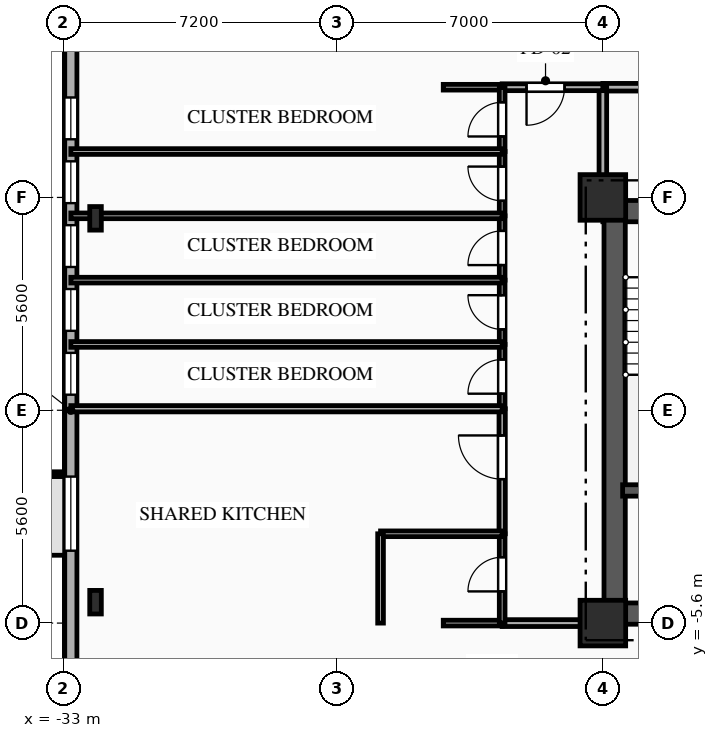
"""IFC4 building model, lengths in metres.
Left out: names, types, materials, properties, quantities, classifications, styles, units other than length and angle.
Written with IfcOpenShell. Run it as: python <this file> out.ifc"""

import sys

from ifc_helpers import new_model, si_unit, direction, frame, frame_2d, origin, origin_2d, place, context, subcontext, project, spatial, rectangle, i_section, extrude, element, fill, save


model = new_model("IFC4")
c1 = context("Model", 3, precision=1e-05, world=origin(), true_north=direction((0.0, 1.0)))
c2 = subcontext(c1, "Body", "Model", "MODEL_VIEW")
j1 = project(units=[si_unit("LENGTHUNIT", "METRE"), si_unit("PLANEANGLEUNIT", "RADIAN")], contexts=[c1])
p1 = place(None, origin())
s1 = spatial("IfcSite", under=j1, at=p1, CompositionType="ELEMENT")
p2 = place(p1, origin())
s2 = spatial("IfcBuilding", under=s1, at=p2, CompositionType="ELEMENT")
p3 = place(p2, frame((0.0, 0.0, 33.7)))
s3 = spatial("IfcBuildingStorey", under=s2, at=p3, CompositionType="ELEMENT", Elevation=33.7)
for number, where, z_axis, x_axis in (
    (1, (-18.8, -5.6, 0.0), (0.0, 0.0, 1.0), (1.0, 0.0, 0.0)),
    (2, (-18.8, 5.6, 0.0), (0.0, 0.0, 1.0), (1.0, 0.0, 0.0)),
):
    element("IfcColumn", number, at=place(p3, frame(where, z_axis=z_axis, x_axis=x_axis)), inside=s3, PredefinedType="COLUMN", context=c2, shape_type="SweptSolid", body=[
        extrude(rectangle(XDim=1.2, YDim=1.2, at=origin_2d()), origin(), (0.0, 0.0, 1.0), 3.35),
    ])
for number, where, z_axis, x_axis in (
    (3, (-32.15, 5.05, 0.0), (0.0, 0.0, 1.0), (1.0, 0.0, 0.0)),
    (4, (-32.15, -5.05, 0.0), (0.0, 0.0, 1.0), (1.0, 0.0, 0.0)),
):
    element("IfcColumn", number, at=place(p3, frame(where, z_axis=z_axis, x_axis=x_axis)), inside=s3, PredefinedType="COLUMN", context=c2, shape_type="SweptSolid", body=[
        extrude(i_section(OverallWidth=0.305, OverallDepth=0.62, WebThickness=0.021, FlangeThickness=0.04, FilletRadius=0.027, at=origin_2d()), origin(), (0.0, 0.0, 1.0), 3.35),
    ])
p4 = place(p3, frame((-32.8, -15.8, 0.0), z_axis=(0.0, 0.0, 1.0), x_axis=(0.0, 1.0, 0.0)))
e5 = element("IfcWall", 5, at=p4, inside=s3, PredefinedType="SOLIDWALL", context=c2, shape_type="SweptSolid", body=[
    extrude(rectangle(XDim=31.6, YDim=0.32, at=frame_2d((15.8, 0.0))), origin(), (0.0, 0.0, 1.0), 3.035),
])
p5 = place(p4, frame((12.105, 0.0, 0.85)))
e6 = element("IfcOpeningElement", 6, at=p5, cuts=e5, PredefinedType="OPENING", context=c2, shape_type="SweptSolid", body=[
    extrude(rectangle(XDim=1.95, YDim=1.85, at=frame_2d((0.975, 0.925))), frame((0.0, 0.17, 0.0), z_axis=(0.0, -1.0, 0.0), x_axis=(1.0, 0.0, 0.0)), (0.0, 0.0, 1.0), 0.34),
])
p6 = place(p4, frame((16.21, 0.0, 0.85)))
e7 = element("IfcOpeningElement", 7, at=p6, cuts=e5, PredefinedType="OPENING", context=c2, shape_type="SweptSolid", body=[
    extrude(rectangle(XDim=1.1, YDim=1.85, at=frame_2d((0.55, 0.925))), frame((0.0, 0.17, 0.0), z_axis=(0.0, -1.0, 0.0), x_axis=(1.0, 0.0, 0.0)), (0.0, 0.0, 1.0), 0.34),
])
p7 = place(p4, frame((17.89, 0.0, 0.85)))
e8 = element("IfcOpeningElement", 8, at=p7, cuts=e5, PredefinedType="OPENING", context=c2, shape_type="SweptSolid", body=[
    extrude(rectangle(XDim=1.1, YDim=1.85, at=frame_2d((0.55, 0.925))), frame((0.0, 0.17, 0.0), z_axis=(0.0, -1.0, 0.0), x_axis=(1.0, 0.0, 0.0)), (0.0, 0.0, 1.0), 0.34),
])
p8 = place(p4, frame((19.57, 0.0, 0.85)))
e9 = element("IfcOpeningElement", 9, at=p8, cuts=e5, PredefinedType="OPENING", context=c2, shape_type="SweptSolid", body=[
    extrude(rectangle(XDim=1.1, YDim=1.85, at=frame_2d((0.55, 0.925))), frame((0.0, 0.17, 0.0), z_axis=(0.0, -1.0, 0.0), x_axis=(1.0, 0.0, 0.0)), (0.0, 0.0, 1.0), 0.34),
])
p9 = place(p4, frame((21.25, 0.0, 0.85)))
e10 = element("IfcOpeningElement", 10, at=p9, cuts=e5, PredefinedType="OPENING", context=c2, shape_type="SweptSolid", body=[
    extrude(rectangle(XDim=1.1, YDim=1.85, at=frame_2d((0.55, 0.925))), frame((0.0, 0.17, 0.0), z_axis=(0.0, -1.0, 0.0), x_axis=(1.0, 0.0, 0.0)), (0.0, 0.0, 1.0), 0.34),
])
p10 = place(p4, frame((22.93, 0.0, 0.85)))
e11 = element("IfcOpeningElement", 11, at=p10, cuts=e5, PredefinedType="OPENING", context=c2, shape_type="SweptSolid", body=[
    extrude(rectangle(XDim=1.1, YDim=1.85, at=frame_2d((0.55, 0.925))), frame((0.0, 0.17, 0.0), z_axis=(0.0, -1.0, 0.0), x_axis=(1.0, 0.0, 0.0)), (0.0, 0.0, 1.0), 0.34),
])
p11 = place(p3, frame((-18.8, 5.24, 0.0), z_axis=(0.0, 0.0, 1.0), x_axis=(1.0, 0.0, 0.0)))
e12 = element("IfcWall", 12, at=p11, inside=s3, PredefinedType="SHEAR", context=c2, shape_type="SweptSolid", body=[
    extrude(rectangle(XDim=9.6, YDim=0.56, at=frame_2d((4.8, 0.0))), origin(), (0.0, 0.0, 1.0), 3.035),
])
p12 = place(p11, frame((1.55, 0.0, 0.0)))
e13 = element("IfcOpeningElement", 13, at=p12, cuts=e12, PredefinedType="OPENING", context=c2, shape_type="SweptSolid", body=[
    extrude(rectangle(XDim=1.1, YDim=2.15, at=frame_2d((0.55, 1.075))), frame((0.0, 0.29, 0.0), z_axis=(0.0, -1.0, 0.0), x_axis=(1.0, 0.0, 0.0)), (0.0, 0.0, 1.0), 0.58),
])
p13 = place(p11, frame((4.775, 0.0, 0.0)))
e14 = element("IfcOpeningElement", 14, at=p13, cuts=e12, PredefinedType="OPENING", context=c2, shape_type="SweptSolid", body=[
    extrude(rectangle(XDim=1.05, YDim=2.1, at=frame_2d((0.525, 1.05))), frame((0.0, 0.29, 0.0), z_axis=(0.0, -1.0, 0.0), x_axis=(1.0, 0.0, 0.0)), (0.0, 0.0, 1.0), 0.58),
])
p14 = place(p3, frame((-18.8, -5.35, 0.0), z_axis=(0.0, 0.0, 1.0), x_axis=(1.0, 0.0, 0.0)))
e15 = element("IfcWall", 15, at=p14, inside=s3, PredefinedType="SHEAR", context=c2, shape_type="SweptSolid", body=[
    extrude(rectangle(XDim=9.6, YDim=0.56, at=frame_2d((4.8, 0.0))), origin(), (0.0, 0.0, 1.0), 3.035),
])
p15 = place(p14, frame((1.05, 0.0, 0.0)))
e16 = element("IfcOpeningElement", 16, at=p15, cuts=e15, PredefinedType="OPENING", context=c2, shape_type="SweptSolid", body=[
    extrude(rectangle(XDim=0.9, YDim=2.1, at=frame_2d((0.45, 1.05))), frame((0.0, 0.29, 0.0), z_axis=(0.0, -1.0, 0.0), x_axis=(1.0, 0.0, 0.0)), (0.0, 0.0, 1.0), 0.58),
])
p16 = place(p3, frame((-18.49, -5.05, 0.0), z_axis=(0.0, 0.0, 1.0), x_axis=(0.0, 1.0, 0.0)))
e17 = element("IfcWall", 17, at=p16, inside=s3, PredefinedType="SHEAR", context=c2, shape_type="SweptSolid", body=[
    extrude(rectangle(XDim=10.1, YDim=0.56, at=frame_2d((5.05, 0.0))), origin(), (0.0, 0.0, 1.0), 3.035),
])
p17 = place(p3, frame((-18.28, -2.11, 0.0), z_axis=(0.0, 0.0, 1.0), x_axis=(1.0, 0.0, 0.0)))
e18 = element("IfcWall", 18, at=p17, inside=s3, PredefinedType="SHEAR", context=c2, shape_type="SweptSolid", body=[
    extrude(rectangle(XDim=3.18, YDim=0.3, at=frame_2d((1.59, 0.0))), origin(), (0.0, 0.0, 1.0), 3.035),
])
p18 = place(p3, frame((-12.0, 8.5, 0.0), z_axis=(0.0, 0.0, 1.0), x_axis=(-1.0, 0.0, 0.0)))
e19 = element("IfcWall", 19, at=p18, inside=s3, PredefinedType="PARTITIONING", context=c2, shape_type="SweptSolid", body=[
    extrude(rectangle(XDim=6.8, YDim=0.2, at=frame_2d((3.4, 0.0))), origin(), (0.0, 0.0, 1.0), 3.035),
])
p19 = place(p18, frame((1.715, 0.0, 0.0)))
e20 = element("IfcOpeningElement", 20, at=p19, cuts=e19, PredefinedType="OPENING", context=c2, shape_type="SweptSolid", body=[
    extrude(rectangle(XDim=1.1, YDim=2.15, at=frame_2d((0.55, 1.075))), frame((0.0, 0.11, 0.0), z_axis=(0.0, -1.0, 0.0), x_axis=(1.0, 0.0, 0.0)), (0.0, 0.0, 1.0), 0.22),
])
p20 = place(p3, frame((-18.8, 8.5, 0.0), z_axis=(0.0, 0.0, 1.0), x_axis=(0.0, -1.0, 0.0)))
e21 = element("IfcWall", 21, at=p20, inside=s3, PredefinedType="PARTITIONING", context=c2, shape_type="SweptSolid", body=[
    extrude(rectangle(XDim=2.9, YDim=0.2, at=frame_2d((1.45, 0.0))), origin(), (0.0, 0.0, 1.0), 2.52),
])
p21 = place(p3, frame((-18.8, 8.5, 0.0), z_axis=(0.0, 0.0, 1.0), x_axis=(-1.0, 0.0, 0.0)))
e22 = element("IfcWall", 22, at=p21, inside=s3, PredefinedType="PARTITIONING", context=c2, shape_type="SweptSolid", body=[
    extrude(rectangle(XDim=2.65, YDim=0.18, at=frame_2d((1.325, 0.0))), origin(), (0.0, 0.0, 1.0), 3.035),
])
p22 = place(p21, frame((1.009, 0.0, 0.0)))
e23 = element("IfcOpeningElement", 23, at=p22, cuts=e22, PredefinedType="OPENING", context=c2, shape_type="SweptSolid", body=[
    extrude(rectangle(XDim=1.0, YDim=2.15, at=frame_2d((0.5, 1.075))), frame((0.0, 0.1, 0.0), z_axis=(0.0, -1.0, 0.0), x_axis=(1.0, 0.0, 0.0)), (0.0, 0.0, 1.0), 0.2),
])
p23 = place(p3, frame((-21.45, 8.5, 0.0), z_axis=(0.0, 0.0, 1.0), x_axis=(-1.0, 0.0, 0.0)))
e24 = element("IfcWall", 24, at=p23, inside=s3, PredefinedType="PARTITIONING", context=c2, shape_type="SweptSolid", body=[
    extrude(rectangle(XDim=1.55, YDim=0.15, at=frame_2d((0.775, 0.0))), origin(), (0.0, 0.0, 1.0), 3.035),
])
p24 = place(p3, frame((-21.45, -5.6, 0.0), z_axis=(0.0, 0.0, 1.0), x_axis=(1.0, 0.0, 0.0)))
e25 = element("IfcWall", 25, at=p24, inside=s3, PredefinedType="PARTITIONING", context=c2, shape_type="SweptSolid", body=[
    extrude(rectangle(XDim=2.65, YDim=0.18, at=frame_2d((1.325, 0.0))), origin(), (0.0, 0.0, 1.0), 3.035),
])
p25 = place(p3, frame((-23.0, -5.6, 0.0), z_axis=(0.0, 0.0, 1.0), x_axis=(1.0, 0.0, 0.0)))
e26 = element("IfcWall", 26, at=p25, inside=s3, PredefinedType="PLUMBINGWALL", context=c2, shape_type="SweptSolid", body=[
    extrude(rectangle(XDim=1.55, YDim=0.15, at=frame_2d((0.775, 0.0))), origin(), (0.0, 0.0, 1.0), 3.035),
])
p26 = place(p3, frame((-21.45, -5.6, 0.0), z_axis=(0.0, 0.0, 1.0), x_axis=(0.0, 1.0, 0.0)))
e27 = element("IfcWall", 27, at=p26, inside=s3, PredefinedType="PLUMBINGWALL", context=c2, shape_type="SweptSolid", body=[
    extrude(rectangle(XDim=2.35, YDim=0.15, at=frame_2d((1.175, 0.0))), origin(), (0.0, 0.0, 1.0), 3.035),
])
p27 = place(p26, frame((0.834, 0.0, 0.0)))
e28 = element("IfcOpeningElement", 28, at=p27, cuts=e27, PredefinedType="OPENING", context=c2, shape_type="SweptSolid", body=[
    extrude(rectangle(XDim=0.9, YDim=2.1, at=frame_2d((0.45, 1.05))), frame((0.0, 0.085, 0.0), z_axis=(0.0, -1.0, 0.0), x_axis=(1.0, 0.0, 0.0)), (0.0, 0.0, 1.0), 0.17),
])
p28 = place(p3, frame((-21.45, -3.25, 0.0), z_axis=(0.0, 0.0, 1.0), x_axis=(0.0, 1.0, 0.0)))
e29 = element("IfcWall", 29, at=p28, inside=s3, PredefinedType="PARTITIONING", context=c2, shape_type="SweptSolid", body=[
    extrude(rectangle(XDim=3.29, YDim=0.165, at=frame_2d((1.645, 0.0))), origin(), (0.0, 0.0, 1.0), 3.035),
])
p29 = place(p28, frame((1.438, 0.0, 0.0)))
e30 = element("IfcOpeningElement", 30, at=p29, cuts=e29, PredefinedType="OPENING", context=c2, shape_type="SweptSolid", body=[
    extrude(rectangle(XDim=1.15, YDim=2.15, at=frame_2d((0.575, 1.075))), frame((0.0, 0.093, 0.0), z_axis=(0.0, -1.0, 0.0), x_axis=(1.0, 0.0, 0.0)), (0.0, 0.0, 1.0), 0.185),
])
p30 = place(p3, frame((-21.45, 0.04, 0.0), z_axis=(0.0, 0.0, 1.0), x_axis=(0.0, 1.0, 0.0)))
e31 = element("IfcWall", 31, at=p30, inside=s3, PredefinedType="PARTITIONING", context=c2, shape_type="SweptSolid", body=[
    extrude(rectangle(XDim=1.692, YDim=0.15, at=frame_2d((0.846, 0.0))), origin(), (0.0, 0.0, 1.0), 3.035),
])
p31 = place(p30, frame((0.396, 0.0, 0.0)))
e32 = element("IfcOpeningElement", 32, at=p31, cuts=e31, PredefinedType="OPENING", context=c2, shape_type="SweptSolid", body=[
    extrude(rectangle(XDim=0.9, YDim=2.1, at=frame_2d((0.45, 1.05))), frame((0.0, 0.085, 0.0), z_axis=(0.0, -1.0, 0.0), x_axis=(1.0, 0.0, 0.0)), (0.0, 0.0, 1.0), 0.17),
])
p32 = place(p3, frame((-21.45, 1.732, 0.0), z_axis=(0.0, 0.0, 1.0), x_axis=(0.0, 1.0, 0.0)))
e33 = element("IfcWall", 33, at=p32, inside=s3, PredefinedType="PARTITIONING", context=c2, shape_type="SweptSolid", body=[
    extrude(rectangle(XDim=1.692, YDim=0.15, at=frame_2d((0.846, 0.0))), origin(), (0.0, 0.0, 1.0), 3.035),
])
p33 = place(p32, frame((0.396, 0.0, 0.0)))
e34 = element("IfcOpeningElement", 34, at=p33, cuts=e33, PredefinedType="OPENING", context=c2, shape_type="SweptSolid", body=[
    extrude(rectangle(XDim=0.9, YDim=2.1, at=frame_2d((0.45, 1.05))), frame((0.0, 0.085, 0.0), z_axis=(0.0, -1.0, 0.0), x_axis=(1.0, 0.0, 0.0)), (0.0, 0.0, 1.0), 0.17),
])
p34 = place(p3, frame((-21.45, 3.424, 0.0), z_axis=(0.0, 0.0, 1.0), x_axis=(0.0, 1.0, 0.0)))
e35 = element("IfcWall", 35, at=p34, inside=s3, PredefinedType="PARTITIONING", context=c2, shape_type="SweptSolid", body=[
    extrude(rectangle(XDim=1.692, YDim=0.15, at=frame_2d((0.846, 0.0))), origin(), (0.0, 0.0, 1.0), 3.035),
])
p35 = place(p34, frame((0.396, 0.0, 0.0)))
e36 = element("IfcOpeningElement", 36, at=p35, cuts=e35, PredefinedType="OPENING", context=c2, shape_type="SweptSolid", body=[
    extrude(rectangle(XDim=0.9, YDim=2.1, at=frame_2d((0.45, 1.05))), frame((0.0, 0.085, 0.0), z_axis=(0.0, -1.0, 0.0), x_axis=(1.0, 0.0, 0.0)), (0.0, 0.0, 1.0), 0.17),
])
p36 = place(p3, frame((-21.45, 5.116, 0.0), z_axis=(0.0, 0.0, 1.0), x_axis=(0.0, 1.0, 0.0)))
e37 = element("IfcWall", 37, at=p36, inside=s3, PredefinedType="PARTITIONING", context=c2, shape_type="SweptSolid", body=[
    extrude(rectangle(XDim=1.692, YDim=0.15, at=frame_2d((0.846, 0.0))), origin(), (0.0, 0.0, 1.0), 3.035),
])
p37 = place(p36, frame((0.396, 0.0, 0.0)))
e38 = element("IfcOpeningElement", 38, at=p37, cuts=e37, PredefinedType="OPENING", context=c2, shape_type="SweptSolid", body=[
    extrude(rectangle(XDim=0.9, YDim=2.1, at=frame_2d((0.45, 1.05))), frame((0.0, 0.085, 0.0), z_axis=(0.0, -1.0, 0.0), x_axis=(1.0, 0.0, 0.0)), (0.0, 0.0, 1.0), 0.17),
])
p38 = place(p3, frame((-21.45, 6.808, 0.0), z_axis=(0.0, 0.0, 1.0), x_axis=(0.0, 1.0, 0.0)))
e39 = element("IfcWall", 39, at=p38, inside=s3, PredefinedType="PARTITIONING", context=c2, shape_type="SweptSolid", body=[
    extrude(rectangle(XDim=1.692, YDim=0.15, at=frame_2d((0.846, 0.0))), origin(), (0.0, 0.0, 1.0), 3.035),
])
p39 = place(p38, frame((0.396, 0.0, 0.0)))
e40 = element("IfcOpeningElement", 40, at=p39, cuts=e39, PredefinedType="OPENING", context=c2, shape_type="SweptSolid", body=[
    extrude(rectangle(XDim=0.9, YDim=2.1, at=frame_2d((0.45, 1.05))), frame((0.0, 0.085, 0.0), z_axis=(0.0, -1.0, 0.0), x_axis=(1.0, 0.0, 0.0)), (0.0, 0.0, 1.0), 0.17),
])
p40 = place(p3, frame((-24.65, -3.25, 0.0), z_axis=(0.0, 0.0, 1.0), x_axis=(1.0, 0.0, 0.0)))
e41 = element("IfcWall", 41, at=p40, inside=s3, PredefinedType="PLUMBINGWALL", context=c2, shape_type="SweptSolid", body=[
    extrude(rectangle(XDim=3.2, YDim=0.15, at=frame_2d((1.6, 0.0))), origin(), (0.0, 0.0, 1.0), 2.52),
])
p41 = place(p3, frame((-24.65, -5.6, 0.0), z_axis=(0.0, 0.0, 1.0), x_axis=(0.0, 1.0, 0.0)))
e42 = element("IfcWall", 42, at=p41, inside=s3, PredefinedType="PLUMBINGWALL", context=c2, shape_type="SweptSolid", body=[
    extrude(rectangle(XDim=2.35, YDim=0.15, at=frame_2d((1.175, 0.0))), origin(), (0.0, 0.0, 1.0), 3.035),
])
p42 = place(p3, frame((-32.8, 0.04, 0.0), z_axis=(0.0, 0.0, 1.0), x_axis=(1.0, 0.0, 0.0)))
e43 = element("IfcWall", 43, at=p42, inside=s3, PredefinedType="PARTITIONING", context=c2, shape_type="SweptSolid", body=[
    extrude(rectangle(XDim=11.35, YDim=0.165, at=frame_2d((5.675, 0.0))), origin(), (0.0, 0.0, 1.0), 3.035),
])
p43 = place(p3, frame((-32.8, 1.732, 0.0), z_axis=(0.0, 0.0, 1.0), x_axis=(1.0, 0.0, 0.0)))
e44 = element("IfcWall", 44, at=p43, inside=s3, PredefinedType="PARTITIONING", context=c2, shape_type="SweptSolid", body=[
    extrude(rectangle(XDim=11.35, YDim=0.15, at=frame_2d((5.675, 0.0))), origin(), (0.0, 0.0, 1.0), 3.035),
])
for number, where, z_axis, x_axis in (
    (45, (-32.8, 3.424, 0.0), (0.0, 0.0, 1.0), (1.0, 0.0, 0.0)),
    (46, (-32.8, 5.116, 0.0), (0.0, 0.0, 1.0), (1.0, 0.0, 0.0)),
):
    element("IfcWall", number, at=place(p3, frame(where, z_axis=z_axis, x_axis=x_axis)), inside=s3, PredefinedType="PARTITIONING", context=c2, shape_type="SweptSolid", body=[
        extrude(rectangle(XDim=11.35, YDim=0.15, at=frame_2d((5.675, 0.0))), origin(), (0.0, 0.0, 1.0), 2.52),
    ])
p44 = place(p3, frame((-32.8, 6.808, 0.0), z_axis=(0.0, 0.0, 1.0), x_axis=(1.0, 0.0, 0.0)))
e47 = element("IfcWall", 47, at=p44, inside=s3, PredefinedType="PARTITIONING", context=c2, shape_type="SweptSolid", body=[
    extrude(rectangle(XDim=11.35, YDim=0.15, at=frame_2d((5.675, 0.0))), origin(), (0.0, 0.0, 1.0), 3.035),
])
p45 = place(p5, origin())
e48 = element("IfcWindow", 48, at=p45, inside=s3, PartitioningType="SINGLE_PANEL", PredefinedType="WINDOW", context=c2, shape_type="SweptSolid", body=[
    extrude(rectangle(XDim=1.95, YDim=1.85, at=frame_2d((0.975, 0.925))), frame((0.0, 0.03, 0.0), z_axis=(0.0, -1.0, 0.0), x_axis=(1.0, 0.0, 0.0)), (0.0, 0.0, 1.0), 0.06),
])
fill(e6, e48)
p46 = place(p6, origin())
e49 = element("IfcWindow", 49, at=p46, inside=s3, PartitioningType="SINGLE_PANEL", PredefinedType="WINDOW", context=c2, shape_type="SweptSolid", body=[
    extrude(rectangle(XDim=1.1, YDim=1.85, at=frame_2d((0.55, 0.925))), frame((0.0, 0.03, 0.0), z_axis=(0.0, -1.0, 0.0), x_axis=(1.0, 0.0, 0.0)), (0.0, 0.0, 1.0), 0.06),
])
fill(e7, e49)
p47 = place(p7, origin())
e50 = element("IfcWindow", 50, at=p47, inside=s3, PartitioningType="SINGLE_PANEL", PredefinedType="WINDOW", context=c2, shape_type="SweptSolid", body=[
    extrude(rectangle(XDim=1.1, YDim=1.85, at=frame_2d((0.55, 0.925))), frame((0.0, 0.03, 0.0), z_axis=(0.0, -1.0, 0.0), x_axis=(1.0, 0.0, 0.0)), (0.0, 0.0, 1.0), 0.06),
])
fill(e8, e50)
p48 = place(p8, origin())
e51 = element("IfcWindow", 51, at=p48, inside=s3, PartitioningType="SINGLE_PANEL", PredefinedType="WINDOW", context=c2, shape_type="SweptSolid", body=[
    extrude(rectangle(XDim=1.1, YDim=1.85, at=frame_2d((0.55, 0.925))), frame((0.0, 0.03, 0.0), z_axis=(0.0, -1.0, 0.0), x_axis=(1.0, 0.0, 0.0)), (0.0, 0.0, 1.0), 0.06),
])
fill(e9, e51)
p49 = place(p9, origin())
e52 = element("IfcWindow", 52, at=p49, inside=s3, PartitioningType="SINGLE_PANEL", PredefinedType="WINDOW", context=c2, shape_type="SweptSolid", body=[
    extrude(rectangle(XDim=1.1, YDim=1.85, at=frame_2d((0.55, 0.925))), frame((0.0, 0.03, 0.0), z_axis=(0.0, -1.0, 0.0), x_axis=(1.0, 0.0, 0.0)), (0.0, 0.0, 1.0), 0.06),
])
fill(e10, e52)
p50 = place(p10, origin())
e53 = element("IfcWindow", 53, at=p50, inside=s3, PartitioningType="SINGLE_PANEL", PredefinedType="WINDOW", context=c2, shape_type="SweptSolid", body=[
    extrude(rectangle(XDim=1.1, YDim=1.85, at=frame_2d((0.55, 0.925))), frame((0.0, 0.03, 0.0), z_axis=(0.0, -1.0, 0.0), x_axis=(1.0, 0.0, 0.0)), (0.0, 0.0, 1.0), 0.06),
])
fill(e11, e53)
p51 = place(p22, origin())
e54 = element("IfcDoor", 54, at=p51, inside=s3, OperationType="SINGLE_SWING_RIGHT", PredefinedType="DOOR", context=c2, shape_type="SweptSolid", body=[
    extrude(rectangle(XDim=1.0, YDim=2.15, at=frame_2d((0.5, 1.075))), frame((0.0, 0.025, 0.0), z_axis=(0.0, -1.0, 0.0), x_axis=(1.0, 0.0, 0.0)), (0.0, 0.0, 1.0), 0.05),
])
fill(e23, e54)
p52 = place(p27, origin())
e55 = element("IfcDoor", 55, at=p52, inside=s3, OperationType="SINGLE_SWING_LEFT", PredefinedType="DOOR", context=c2, shape_type="SweptSolid", body=[
    extrude(rectangle(XDim=0.9, YDim=2.1, at=frame_2d((0.45, 1.05))), frame((0.0, 0.025, 0.0), z_axis=(0.0, -1.0, 0.0), x_axis=(1.0, 0.0, 0.0)), (0.0, 0.0, 1.0), 0.05),
])
fill(e28, e55)
p53 = place(p29, origin())
e56 = element("IfcDoor", 56, at=p53, inside=s3, OperationType="SINGLE_SWING_RIGHT", PredefinedType="DOOR", context=c2, shape_type="SweptSolid", body=[
    extrude(rectangle(XDim=1.15, YDim=2.15, at=frame_2d((0.575, 1.075))), frame((0.0, 0.025, 0.0), z_axis=(0.0, -1.0, 0.0), x_axis=(1.0, 0.0, 0.0)), (0.0, 0.0, 1.0), 0.05),
])
fill(e30, e56)
p54 = place(p31, origin())
e57 = element("IfcDoor", 57, at=p54, inside=s3, OperationType="SINGLE_SWING_LEFT", PredefinedType="DOOR", context=c2, shape_type="SweptSolid", body=[
    extrude(rectangle(XDim=0.9, YDim=2.1, at=frame_2d((0.45, 1.05))), frame((0.0, 0.025, 0.0), z_axis=(0.0, -1.0, 0.0), x_axis=(1.0, 0.0, 0.0)), (0.0, 0.0, 1.0), 0.05),
])
fill(e32, e57)
p55 = place(p33, origin())
e58 = element("IfcDoor", 58, at=p55, inside=s3, OperationType="SINGLE_SWING_RIGHT", PredefinedType="DOOR", context=c2, shape_type="SweptSolid", body=[
    extrude(rectangle(XDim=0.9, YDim=2.1, at=frame_2d((0.45, 1.05))), frame((0.0, 0.025, 0.0), z_axis=(0.0, -1.0, 0.0), x_axis=(1.0, 0.0, 0.0)), (0.0, 0.0, 1.0), 0.05),
])
fill(e34, e58)
p56 = place(p35, origin())
e59 = element("IfcDoor", 59, at=p56, inside=s3, OperationType="SINGLE_SWING_LEFT", PredefinedType="DOOR", context=c2, shape_type="SweptSolid", body=[
    extrude(rectangle(XDim=0.9, YDim=2.1, at=frame_2d((0.45, 1.05))), frame((0.0, 0.025, 0.0), z_axis=(0.0, -1.0, 0.0), x_axis=(1.0, 0.0, 0.0)), (0.0, 0.0, 1.0), 0.05),
])
fill(e36, e59)
p57 = place(p37, origin())
e60 = element("IfcDoor", 60, at=p57, inside=s3, OperationType="SINGLE_SWING_RIGHT", PredefinedType="DOOR", context=c2, shape_type="SweptSolid", body=[
    extrude(rectangle(XDim=0.9, YDim=2.1, at=frame_2d((0.45, 1.05))), frame((0.0, 0.025, 0.0), z_axis=(0.0, -1.0, 0.0), x_axis=(1.0, 0.0, 0.0)), (0.0, 0.0, 1.0), 0.05),
])
fill(e38, e60)
p58 = place(p39, origin())
e61 = element("IfcDoor", 61, at=p58, inside=s3, OperationType="SINGLE_SWING_LEFT", PredefinedType="DOOR", context=c2, shape_type="SweptSolid", body=[
    extrude(rectangle(XDim=0.9, YDim=2.1, at=frame_2d((0.45, 1.05))), frame((0.0, 0.025, 0.0), z_axis=(0.0, -1.0, 0.0), x_axis=(1.0, 0.0, 0.0)), (0.0, 0.0, 1.0), 0.05),
])
fill(e40, e61)
save(model, sys.argv[1])
